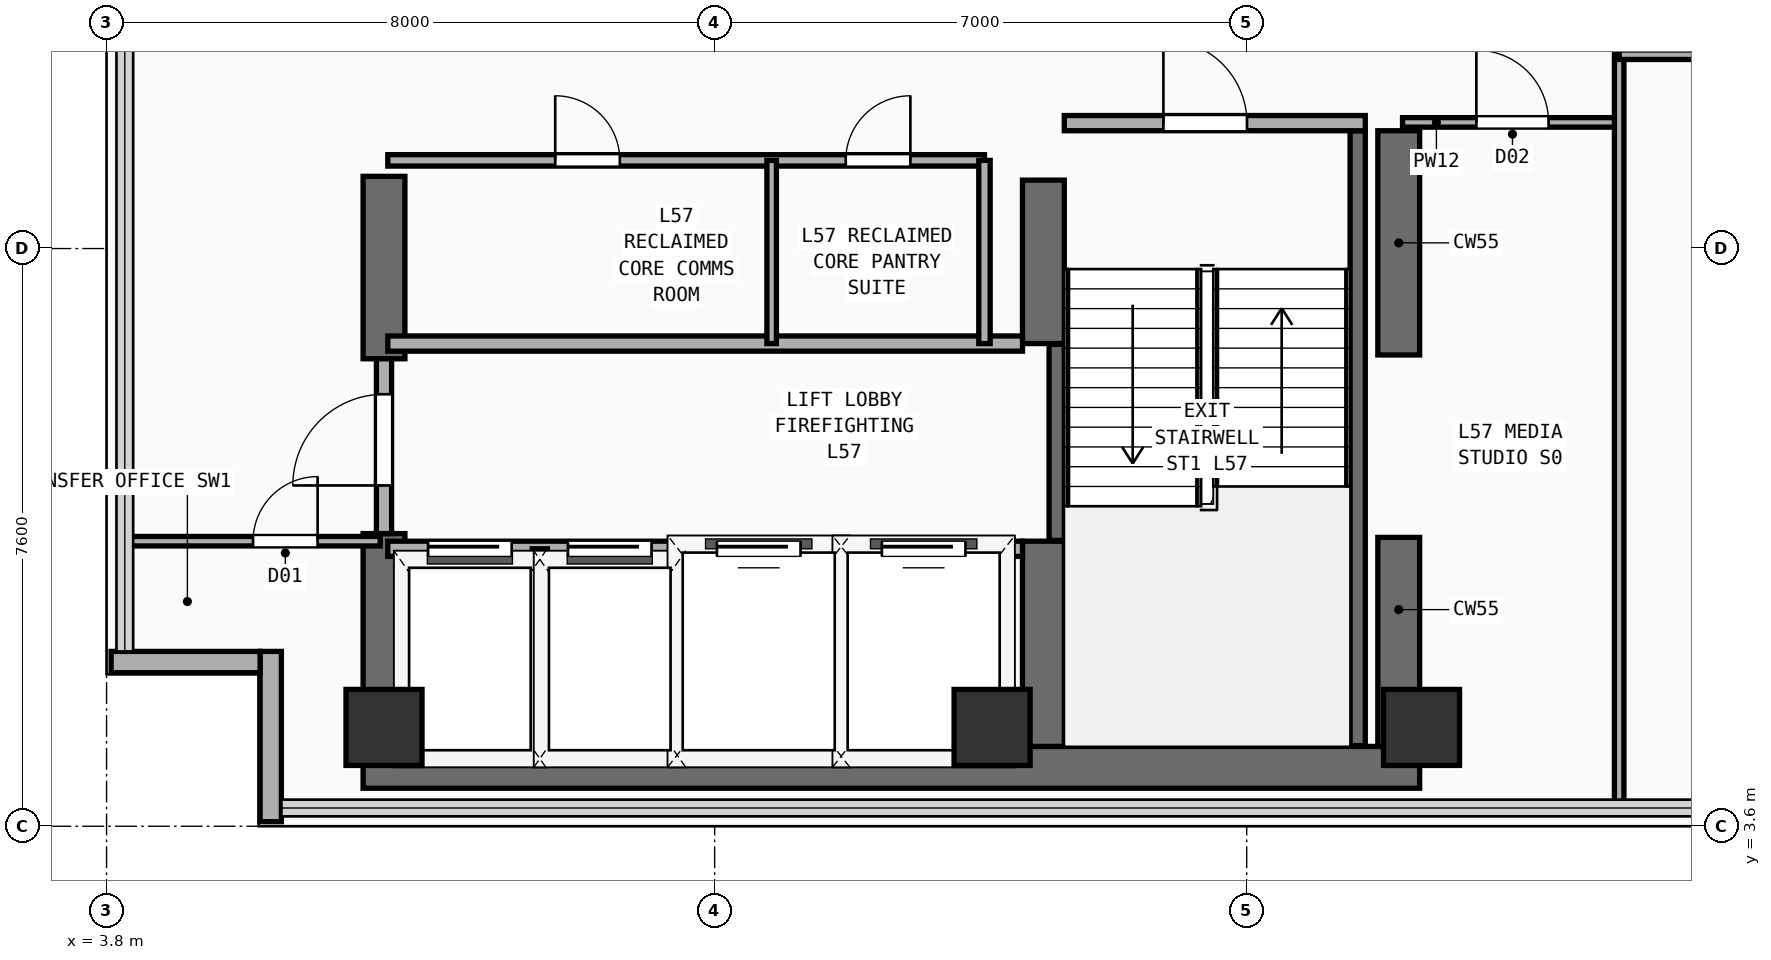
"""IFC4 building model, lengths in metres.
Left out: names, types, materials, properties, quantities, classifications, styles, units other than length and angle.
Written with IfcOpenShell. Run it as: python <this file> out.ifc"""

import sys

from ifc_helpers import new_model, si_unit, direction, frame, frame_2d, origin, origin_2d, place, context, subcontext, project, spatial, rectangle, extrude, element, fill, save


model = new_model("IFC4")
c1 = context("Model", 3, precision=1e-05, world=origin(), true_north=direction((0.0, 1.0)))
c2 = subcontext(c1, "Body", "Model", "MODEL_VIEW")
j1 = project(units=[si_unit("LENGTHUNIT", "METRE"), si_unit("PLANEANGLEUNIT", "RADIAN")], contexts=[c1])
p1 = place(None, origin())
s1 = spatial("IfcSite", under=j1, at=p1, CompositionType="ELEMENT")
p2 = place(p1, origin())
s2 = spatial("IfcBuilding", under=s1, at=p2, CompositionType="ELEMENT")
p3 = place(p2, frame((0.0, 0.0, 223.5)))
s3 = spatial("IfcBuildingStorey", under=s2, at=p3, CompositionType="ELEMENT", Elevation=223.5)
p4 = place(p3, frame((7.175, 4.375, 0.0), z_axis=(0.0, 0.0, 1.0), x_axis=(1.0, 0.0, 0.0)))
e1 = element("IfcWall", 1, at=p4, inside=s3, PredefinedType="SHEAR", context=c2, shape_type="SweptSolid", body=[
    extrude(rectangle(XDim=13.9, YDim=0.55, at=frame_2d((6.95, 0.0))), origin(), (0.0, 0.0, 1.0), 3.56),
])
p5 = place(p3, frame((7.45, 4.65, 0.0), z_axis=(0.0, 0.0, 1.0), x_axis=(0.0, 1.0, 0.0)))
e2 = element("IfcWall", 2, at=p5, inside=s3, PredefinedType="SHEAR", context=c2, shape_type="SweptSolid", body=[
    extrude(rectangle(XDim=2.8, YDim=0.55, at=frame_2d((1.4, 0.0))), origin(), (0.0, 0.0, 1.0), 3.56),
])
p6 = place(p3, frame((7.45, 9.75, 0.0), z_axis=(0.0, 0.0, 1.0), x_axis=(0.0, 1.0, 0.0)))
e3 = element("IfcWall", 3, at=p6, inside=s3, PredefinedType="SHEAR", context=c2, shape_type="SweptSolid", body=[
    extrude(rectangle(XDim=2.4, YDim=0.55, at=frame_2d((1.2, 0.0))), origin(), (0.0, 0.0, 1.0), 3.56),
])
p7 = place(p3, frame((20.8, 4.65, 0.0), z_axis=(0.0, 0.0, 1.0), x_axis=(0.0, 1.0, 0.0)))
e4 = element("IfcWall", 4, at=p7, inside=s3, PredefinedType="SHEAR", context=c2, shape_type="SweptSolid", body=[
    extrude(rectangle(XDim=2.75, YDim=0.55, at=frame_2d((1.375, 0.0))), origin(), (0.0, 0.0, 1.0), 3.56),
])
p8 = place(p3, frame((20.8, 9.8, 0.0), z_axis=(0.0, 0.0, 1.0), x_axis=(0.0, 1.0, 0.0)))
e5 = element("IfcWall", 5, at=p8, inside=s3, PredefinedType="SHEAR", context=c2, shape_type="SweptSolid", body=[
    extrude(rectangle(XDim=2.95, YDim=0.55, at=frame_2d((1.475, 0.0))), origin(), (0.0, 0.0, 1.0), 3.56),
])
p9 = place(p3, frame((16.125, 4.65, 0.0), z_axis=(0.0, 0.0, 1.0), x_axis=(0.0, 1.0, 0.0)))
e6 = element("IfcWall", 6, at=p9, inside=s3, PredefinedType="SHEAR", context=c2, shape_type="SweptSolid", body=[
    extrude(rectangle(XDim=2.7, YDim=0.55, at=frame_2d((1.35, 0.0))), origin(), (0.0, 0.0, 1.0), 3.56),
])
p10 = place(p3, frame((16.125, 9.95, 0.0), z_axis=(0.0, 0.0, 1.0), x_axis=(0.0, 1.0, 0.0)))
e7 = element("IfcWall", 7, at=p10, inside=s3, PredefinedType="SHEAR", context=c2, shape_type="SweptSolid", body=[
    extrude(rectangle(XDim=2.15, YDim=0.55, at=frame_2d((1.075, 0.0))), origin(), (0.0, 0.0, 1.0), 3.56),
])
for number, where, z_axis, x_axis in (
    (8, (7.45, 4.9, 0.0), (0.0, 0.0, 1.0), (1.0, 0.0, 0.0)),
    (9, (15.45, 4.9, 0.0), (0.0, 0.0, 1.0), (1.0, 0.0, 0.0)),
    (10, (21.1, 4.9, 0.0), (0.0, 0.0, 1.0), (1.0, 0.0, 0.0)),
):
    element("IfcColumn", number, at=place(p3, frame(where, z_axis=z_axis, x_axis=x_axis)), inside=s3, PredefinedType="COLUMN", context=c2, shape_type="SweptSolid", body=[
        extrude(rectangle(XDim=1.0, YDim=1.0, at=origin_2d()), origin(), (0.0, 0.0, 1.0), 3.56),
    ])
p11 = place(p3, frame((5.96, 3.66, 0.0), z_axis=(0.0, 0.0, 1.0), x_axis=(0.0, 1.0, 0.0)))
e11 = element("IfcWall", 11, at=p11, inside=s3, PredefinedType="SOLIDWALL", context=c2, shape_type="SweptSolid", body=[
    extrude(rectangle(XDim=2.24, YDim=0.28, at=frame_2d((1.12, 0.0))), origin(), (0.0, 0.0, 1.0), 3.56),
])
p12 = place(p3, frame((3.86, 5.76, 0.0), z_axis=(0.0, 0.0, 1.0), x_axis=(1.0, 0.0, 0.0)))
e12 = element("IfcWall", 12, at=p12, inside=s3, PredefinedType="SOLIDWALL", context=c2, shape_type="SweptSolid", body=[
    extrude(rectangle(XDim=1.96, YDim=0.28, at=frame_2d((0.98, 0.0))), origin(), (0.0, 0.0, 1.0), 3.56),
])
p13 = place(p3, frame((16.3, 7.36, 0.0), z_axis=(0.0, 0.0, 1.0), x_axis=(0.0, 1.0, 0.0)))
e13 = element("IfcWall", 13, at=p13, inside=s3, PredefinedType="SHEAR", context=c2, shape_type="SweptSolid", body=[
    extrude(rectangle(XDim=2.58, YDim=0.2, at=frame_2d((1.29, 0.0))), origin(), (0.0, 0.0, 1.0), 3.56),
])
p14 = place(p3, frame((20.26, 4.66, 0.0), z_axis=(0.0, 0.0, 1.0), x_axis=(0.0, 1.0, 0.0)))
e14 = element("IfcWall", 14, at=p14, inside=s3, PredefinedType="SHEAR", context=c2, shape_type="SweptSolid", body=[
    extrude(rectangle(XDim=8.09, YDim=0.2, at=frame_2d((4.045, 0.0))), origin(), (0.0, 0.0, 1.0), 3.56),
])
p15 = place(p3, frame((16.4, 12.85, 0.0), z_axis=(0.0, 0.0, 1.0), x_axis=(1.0, 0.0, 0.0)))
e15 = element("IfcWall", 15, at=p15, inside=s3, PredefinedType="PARTITIONING", context=c2, shape_type="SweptSolid", body=[
    extrude(rectangle(XDim=3.96, YDim=0.2, at=frame_2d((1.98, 0.0))), origin(), (0.0, 0.0, 1.0), 3.56),
])
p16 = place(p15, frame((1.304, 0.0, 0.0)))
e16 = element("IfcOpeningElement", 16, at=p16, cuts=e15, PredefinedType="OPENING", context=c2, shape_type="SweptSolid", body=[
    extrude(rectangle(XDim=1.1, YDim=2.2, at=frame_2d((0.55, 1.1))), frame((0.0, 0.11, 0.0), z_axis=(0.0, -1.0, 0.0), x_axis=(1.0, 0.0, 0.0)), (0.0, 0.0, 1.0), 0.22),
])
p17 = place(p3, frame((7.5, 7.25, 0.0), z_axis=(0.0, 0.0, 1.0), x_axis=(1.0, 0.0, 0.0)))
e17 = element("IfcWall", 17, at=p17, inside=s3, PredefinedType="PARTITIONING", context=c2, shape_type="SweptSolid", body=[
    extrude(rectangle(XDim=8.35, YDim=0.2, at=frame_2d((4.175, 0.0))), origin(), (0.0, 0.0, 1.0), 3.56),
])
p18 = place(p17, frame((0.53, 0.0, 0.0)))
e18 = element("IfcOpeningElement", 18, at=p18, cuts=e17, PredefinedType="OPENING", context=c2, shape_type="SweptSolid", body=[
    extrude(rectangle(XDim=1.1, YDim=2.2, at=frame_2d((0.55, 1.1))), frame((0.0, 0.11, 0.0), z_axis=(0.0, -1.0, 0.0), x_axis=(1.0, 0.0, 0.0)), (0.0, 0.0, 1.0), 0.22),
])
p19 = place(p17, frame((2.37, 0.0, 0.0)))
e19 = element("IfcOpeningElement", 19, at=p19, cuts=e17, PredefinedType="OPENING", context=c2, shape_type="SweptSolid", body=[
    extrude(rectangle(XDim=1.1, YDim=2.2, at=frame_2d((0.55, 1.1))), frame((0.0, 0.11, 0.0), z_axis=(0.0, -1.0, 0.0), x_axis=(1.0, 0.0, 0.0)), (0.0, 0.0, 1.0), 0.22),
])
p20 = place(p17, frame((4.33, 0.0, 0.0)))
e20 = element("IfcOpeningElement", 20, at=p20, cuts=e17, PredefinedType="OPENING", context=c2, shape_type="SweptSolid", body=[
    extrude(rectangle(XDim=1.1, YDim=2.2, at=frame_2d((0.55, 1.1))), frame((0.0, 0.11, 0.0), z_axis=(0.0, -1.0, 0.0), x_axis=(1.0, 0.0, 0.0)), (0.0, 0.0, 1.0), 0.22),
])
p21 = place(p17, frame((6.5, 0.0, 0.0)))
e21 = element("IfcOpeningElement", 21, at=p21, cuts=e17, PredefinedType="OPENING", context=c2, shape_type="SweptSolid", body=[
    extrude(rectangle(XDim=1.1, YDim=2.2, at=frame_2d((0.55, 1.1))), frame((0.0, 0.11, 0.0), z_axis=(0.0, -1.0, 0.0), x_axis=(1.0, 0.0, 0.0)), (0.0, 0.0, 1.0), 0.22),
])
p22 = place(p3, frame((7.5, 9.95, 0.0), z_axis=(0.0, 0.0, 1.0), x_axis=(1.0, 0.0, 0.0)))
e22 = element("IfcWall", 22, at=p22, inside=s3, PredefinedType="PARTITIONING", context=c2, shape_type="SweptSolid", body=[
    extrude(rectangle(XDim=8.35, YDim=0.2, at=frame_2d((4.175, 0.0))), origin(), (0.0, 0.0, 1.0), 3.56),
])
for number, where, z_axis, x_axis in (
    (23, (9.5, 4.45, 0.0), (0.0, 0.0, 1.0), (0.0, 1.0, 0.0)),
    (24, (11.36, 4.45, 0.0), (0.0, 0.0, 1.0), (0.0, 1.0, 0.0)),
    (25, (13.46, 4.45, 0.0), (0.0, 0.0, 1.0), (0.0, 1.0, 0.0)),
):
    element("IfcWall", number, at=place(p3, frame(where, z_axis=z_axis, x_axis=x_axis)), inside=s3, PredefinedType="PARTITIONING", context=c2, shape_type="SweptSolid", body=[
        extrude(rectangle(XDim=2.8, YDim=0.2, at=frame_2d((1.4, 0.0))), origin(), (0.0, 0.0, 1.0), 3.56),
    ])
p23 = place(p3, frame((7.45, 7.45, 0.0), z_axis=(0.0, 0.0, 1.0), x_axis=(0.0, 1.0, 0.0)))
e26 = element("IfcWall", 26, at=p23, inside=s3, PredefinedType="PARTITIONING", context=c2, shape_type="SweptSolid", body=[
    extrude(rectangle(XDim=2.3, YDim=0.2, at=frame_2d((1.15, 0.0))), origin(), (0.0, 0.0, 1.0), 2.54),
])
p24 = place(p23, frame((0.633, 0.0, 0.0)))
e27 = element("IfcOpeningElement", 27, at=p24, cuts=e26, PredefinedType="OPENING", context=c2, shape_type="SweptSolid", body=[
    extrude(rectangle(XDim=1.2, YDim=2.25, at=frame_2d((0.6, 1.125))), frame((0.0, 0.11, 0.0), z_axis=(0.0, -1.0, 0.0), x_axis=(1.0, 0.0, 0.0)), (0.0, 0.0, 1.0), 0.22),
])
p25 = place(p3, frame((7.5, 12.36, 0.0), z_axis=(0.0, 0.0, 1.0), x_axis=(1.0, 0.0, 0.0)))
e28 = element("IfcWall", 28, at=p25, inside=s3, PredefinedType="PARTITIONING", context=c2, shape_type="SweptSolid", body=[
    extrude(rectangle(XDim=7.85, YDim=0.15, at=frame_2d((3.925, 0.0))), origin(), (0.0, 0.0, 1.0), 3.56),
])
p26 = place(p25, frame((2.202, 0.0, 0.0)))
e29 = element("IfcOpeningElement", 29, at=p26, cuts=e28, PredefinedType="OPENING", context=c2, shape_type="SweptSolid", body=[
    extrude(rectangle(XDim=0.85, YDim=2.15, at=frame_2d((0.425, 1.075))), frame((0.0, 0.085, 0.0), z_axis=(0.0, -1.0, 0.0), x_axis=(1.0, 0.0, 0.0)), (0.0, 0.0, 1.0), 0.17),
])
p27 = place(p25, frame((6.025, 0.0, 0.0)))
e30 = element("IfcOpeningElement", 30, at=p27, cuts=e28, PredefinedType="OPENING", context=c2, shape_type="SweptSolid", body=[
    extrude(rectangle(XDim=0.85, YDim=2.15, at=frame_2d((0.425, 1.075))), frame((0.0, 0.085, 0.0), z_axis=(0.0, -1.0, 0.0), x_axis=(1.0, 0.0, 0.0)), (0.0, 0.0, 1.0), 0.17),
])
p28 = place(p3, frame((15.35, 9.95, 0.0), z_axis=(0.0, 0.0, 1.0), x_axis=(0.0, 1.0, 0.0)))
e31 = element("IfcWall", 31, at=p28, inside=s3, PredefinedType="PARTITIONING", context=c2, shape_type="SweptSolid", body=[
    extrude(rectangle(XDim=2.41, YDim=0.15, at=frame_2d((1.205, 0.0))), origin(), (0.0, 0.0, 1.0), 3.56),
])
p29 = place(p3, frame((12.55, 9.95, 0.0), z_axis=(0.0, 0.0, 1.0), x_axis=(0.0, 1.0, 0.0)))
e32 = element("IfcWall", 32, at=p29, inside=s3, PredefinedType="PARTITIONING", context=c2, shape_type="SweptSolid", body=[
    extrude(rectangle(XDim=2.41, YDim=0.125, at=frame_2d((1.205, 0.0))), origin(), (0.0, 0.0, 1.0), 3.56),
])
p30 = place(p3, frame((4.04, 7.35, 0.0), z_axis=(0.0, 0.0, 1.0), x_axis=(1.0, 0.0, 0.0)))
e33 = element("IfcWall", 33, at=p30, inside=s3, PredefinedType="PARTITIONING", context=c2, shape_type="SweptSolid", body=[
    extrude(rectangle(XDim=3.36, YDim=0.125, at=frame_2d((1.68, 0.0))), origin(), (0.0, 0.0, 1.0), 3.56),
])
p31 = place(p30, frame((1.687, 0.0, 0.0)))
e34 = element("IfcOpeningElement", 34, at=p31, cuts=e33, PredefinedType="OPENING", context=c2, shape_type="SweptSolid", body=[
    extrude(rectangle(XDim=0.85, YDim=2.15, at=frame_2d((0.425, 1.075))), frame((0.0, 0.073, 0.0), z_axis=(0.0, -1.0, 0.0), x_axis=(1.0, 0.0, 0.0)), (0.0, 0.0, 1.0), 0.145),
])
p32 = place(p3, frame((20.85, 12.86, 0.0), z_axis=(0.0, 0.0, 1.0), x_axis=(1.0, 0.0, 0.0)))
e35 = element("IfcWall", 35, at=p32, inside=s3, PredefinedType="PARTITIONING", context=c2, shape_type="SweptSolid", body=[
    extrude(rectangle(XDim=2.85, YDim=0.125, at=frame_2d((1.425, 0.0))), origin(), (0.0, 0.0, 1.0), 3.56),
])
p33 = place(p32, frame((0.971, 0.0, 0.0)))
e36 = element("IfcOpeningElement", 36, at=p33, cuts=e35, PredefinedType="OPENING", context=c2, shape_type="SweptSolid", body=[
    extrude(rectangle(XDim=0.95, YDim=2.15, at=frame_2d((0.475, 1.075))), frame((0.0, 0.073, 0.0), z_axis=(0.0, -1.0, 0.0), x_axis=(1.0, 0.0, 0.0)), (0.0, 0.0, 1.0), 0.145),
])
p34 = place(p3, frame((23.7, 3.84, 0.0), z_axis=(0.0, 0.0, 1.0), x_axis=(0.0, 1.0, 0.0)))
e37 = element("IfcWall", 37, at=p34, inside=s3, PredefinedType="PARTITIONING", context=c2, shape_type="SweptSolid", body=[
    extrude(rectangle(XDim=9.91, YDim=0.125, at=frame_2d((4.955, 0.0))), origin(), (0.0, 0.0, 1.0), 3.56),
])
p35 = place(p3, frame((23.7, 13.75, 0.0), z_axis=(0.0, 0.0, 1.0), x_axis=(1.0, 0.0, 0.0)))
e38 = element("IfcWall", 38, at=p35, inside=s3, PredefinedType="PARTITIONING", context=c2, shape_type="SweptSolid", body=[
    extrude(rectangle(XDim=11.75, YDim=0.125, at=frame_2d((5.875, 0.0))), origin(), (0.0, 0.0, 1.0), 3.2),
])
p36 = place(p35, frame((2.52, 0.0, 0.0)))
e39 = element("IfcOpeningElement", 39, at=p36, cuts=e38, PredefinedType="OPENING", context=c2, shape_type="SweptSolid", body=[
    extrude(rectangle(XDim=0.95, YDim=2.15, at=frame_2d((0.475, 1.075))), frame((0.0, 0.073, 0.0), z_axis=(0.0, -1.0, 0.0), x_axis=(1.0, 0.0, 0.0)), (0.0, 0.0, 1.0), 0.145),
])
p37 = place(p35, frame((7.847, 0.0, 0.0)))
e40 = element("IfcOpeningElement", 40, at=p37, cuts=e38, PredefinedType="OPENING", context=c2, shape_type="SweptSolid", body=[
    extrude(rectangle(XDim=0.95, YDim=2.15, at=frame_2d((0.475, 1.075))), frame((0.0, 0.073, 0.0), z_axis=(0.0, -1.0, 0.0), x_axis=(1.0, 0.0, 0.0)), (0.0, 0.0, 1.0), 0.145),
])
p38 = place(p16, frame((1.1, 0.0, 0.0), z_axis=(0.0, 0.0, 1.0), x_axis=(-1.0, 0.0, 0.0)))
e41 = element("IfcDoor", 41, at=p38, inside=s3, OperationType="SINGLE_SWING_RIGHT", PredefinedType="DOOR", context=c2, shape_type="SweptSolid", body=[
    extrude(rectangle(XDim=1.1, YDim=2.2, at=frame_2d((0.55, 1.1))), frame((0.0, 0.025, 0.0), z_axis=(0.0, -1.0, 0.0), x_axis=(1.0, 0.0, 0.0)), (0.0, 0.0, 1.0), 0.05),
])
fill(e16, e41)
p39 = place(p18, origin())
e42 = element("IfcDoor", 42, at=p39, inside=s3, OperationType="SLIDING_TO_LEFT", PredefinedType="DOOR", context=c2, shape_type="SweptSolid", body=[
    extrude(rectangle(XDim=1.1, YDim=2.2, at=frame_2d((0.55, 1.1))), frame((0.0, 0.025, 0.0), z_axis=(0.0, -1.0, 0.0), x_axis=(1.0, 0.0, 0.0)), (0.0, 0.0, 1.0), 0.05),
])
fill(e18, e42)
p40 = place(p19, origin())
e43 = element("IfcDoor", 43, at=p40, inside=s3, OperationType="SLIDING_TO_LEFT", PredefinedType="DOOR", context=c2, shape_type="SweptSolid", body=[
    extrude(rectangle(XDim=1.1, YDim=2.2, at=frame_2d((0.55, 1.1))), frame((0.0, 0.025, 0.0), z_axis=(0.0, -1.0, 0.0), x_axis=(1.0, 0.0, 0.0)), (0.0, 0.0, 1.0), 0.05),
])
fill(e19, e43)
p41 = place(p20, origin())
e44 = element("IfcDoor", 44, at=p41, inside=s3, OperationType="SLIDING_TO_LEFT", PredefinedType="DOOR", context=c2, shape_type="SweptSolid", body=[
    extrude(rectangle(XDim=1.1, YDim=2.2, at=frame_2d((0.55, 1.1))), frame((0.0, 0.025, 0.0), z_axis=(0.0, -1.0, 0.0), x_axis=(1.0, 0.0, 0.0)), (0.0, 0.0, 1.0), 0.05),
])
fill(e20, e44)
p42 = place(p21, origin())
e45 = element("IfcDoor", 45, at=p42, inside=s3, OperationType="SLIDING_TO_LEFT", PredefinedType="DOOR", context=c2, shape_type="SweptSolid", body=[
    extrude(rectangle(XDim=1.1, YDim=2.2, at=frame_2d((0.55, 1.1))), frame((0.0, 0.025, 0.0), z_axis=(0.0, -1.0, 0.0), x_axis=(1.0, 0.0, 0.0)), (0.0, 0.0, 1.0), 0.05),
])
fill(e21, e45)
p43 = place(p24, frame((1.2, 0.0, 0.0), z_axis=(0.0, 0.0, 1.0), x_axis=(-1.0, 0.0, 0.0)))
e46 = element("IfcDoor", 46, at=p43, inside=s3, OperationType="SINGLE_SWING_RIGHT", PredefinedType="DOOR", context=c2, shape_type="SweptSolid", body=[
    extrude(rectangle(XDim=1.2, YDim=2.25, at=frame_2d((0.6, 1.125))), frame((0.0, 0.025, 0.0), z_axis=(0.0, -1.0, 0.0), x_axis=(1.0, 0.0, 0.0)), (0.0, 0.0, 1.0), 0.05),
])
fill(e27, e46)
p44 = place(p26, origin())
e47 = element("IfcDoor", 47, at=p44, inside=s3, OperationType="SINGLE_SWING_LEFT", PredefinedType="DOOR", context=c2, shape_type="SweptSolid", body=[
    extrude(rectangle(XDim=0.85, YDim=2.15, at=frame_2d((0.425, 1.075))), frame((0.0, 0.025, 0.0), z_axis=(0.0, -1.0, 0.0), x_axis=(1.0, 0.0, 0.0)), (0.0, 0.0, 1.0), 0.05),
])
fill(e29, e47)
p45 = place(p27, origin())
e48 = element("IfcDoor", 48, at=p45, inside=s3, OperationType="SINGLE_SWING_RIGHT", PredefinedType="DOOR", context=c2, shape_type="SweptSolid", body=[
    extrude(rectangle(XDim=0.85, YDim=2.15, at=frame_2d((0.425, 1.075))), frame((0.0, 0.025, 0.0), z_axis=(0.0, -1.0, 0.0), x_axis=(1.0, 0.0, 0.0)), (0.0, 0.0, 1.0), 0.05),
])
fill(e30, e48)
p46 = place(p31, origin())
e49 = element("IfcDoor", 49, at=p46, inside=s3, OperationType="SINGLE_SWING_RIGHT", PredefinedType="DOOR", context=c2, shape_type="SweptSolid", body=[
    extrude(rectangle(XDim=0.85, YDim=2.15, at=frame_2d((0.425, 1.075))), frame((0.0, 0.025, 0.0), z_axis=(0.0, -1.0, 0.0), x_axis=(1.0, 0.0, 0.0)), (0.0, 0.0, 1.0), 0.05),
])
fill(e34, e49)
p47 = place(p33, origin())
e50 = element("IfcDoor", 50, at=p47, inside=s3, OperationType="SINGLE_SWING_LEFT", PredefinedType="DOOR", context=c2, shape_type="SweptSolid", body=[
    extrude(rectangle(XDim=0.95, YDim=2.15, at=frame_2d((0.475, 1.075))), frame((0.0, 0.025, 0.0), z_axis=(0.0, -1.0, 0.0), x_axis=(1.0, 0.0, 0.0)), (0.0, 0.0, 1.0), 0.05),
])
fill(e36, e50)
save(model, sys.argv[1])
